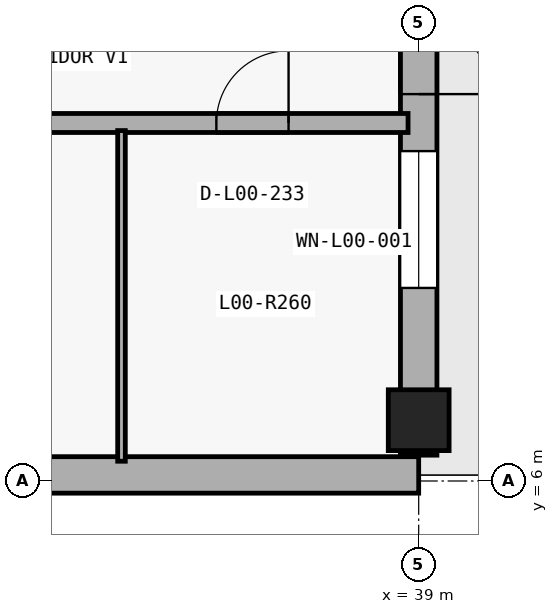
"""IFC4 building model, lengths in metres.
Left out: names, types, materials, properties, quantities, classifications, styles, units other than length and angle.
Written with IfcOpenShell. Run it as: python <this file> out.ifc"""

import sys

from ifc_helpers import new_model, si_unit, direction, frame, frame_2d, origin_with_axes, origin_2d_with_axis, place, context, subcontext, project, spatial, rectangle, circle, extrude, element, fill, save


model = new_model("IFC4")
c1 = context("Model", 3, precision=1e-05, world=origin_with_axes(), true_north=direction((0.0, 1.0)))
c2 = subcontext(c1, "Body", "Model", "MODEL_VIEW")
j1 = project(units=[si_unit("LENGTHUNIT", "METRE"), si_unit("PLANEANGLEUNIT", "RADIAN")], contexts=[c1])
p1 = place(None, origin_with_axes())
s1 = spatial("IfcSite", under=j1, at=p1, CompositionType="ELEMENT")
p2 = place(p1, origin_with_axes())
s2 = spatial("IfcBuilding", under=s1, at=p2, CompositionType="ELEMENT")
p3 = place(p2, origin_with_axes())
s3 = spatial("IfcBuildingStorey", under=s2, at=p3, CompositionType="ELEMENT", Elevation=0.0)
p4 = place(None, frame((6.08, 6.08, 0.0), z_axis=(0.0, 0.0, 1.0), x_axis=(1.0, 0.0, 0.0)))
e1 = element("IfcWall", 1, at=p4, inside=s3, PredefinedType="SOLIDWALL", context=c2, shape_type="SweptSolid", body=[
    extrude(rectangle(XDim=32.92, YDim=0.48, at=frame_2d((16.46, 0.0), x_axis=(1.0, 0.0))), origin_with_axes(), (0.0, 0.0, 1.0), 5.1),
])
p5 = place(None, frame((11.78, 6.08, 0.0), z_axis=(0.0, 0.0, 1.0), x_axis=(1.0, 0.0, 0.0)))
e2 = element("IfcOpeningElement", 2, at=p5, cuts=e1, PredefinedType="OPENING", context=c2, shape_type="SweptSolid", body=[
    extrude(rectangle(XDim=2.4, YDim=2.7, at=frame_2d((0.0, 1.35), x_axis=(1.0, 0.0))), frame((0.0, 0.25, 0.0), z_axis=(0.0, -1.0, 0.0), x_axis=(1.0, 0.0, 0.0)), (0.0, 0.0, 1.0), 0.5),
])
p6 = place(None, frame((32.58, 6.08, 0.0), z_axis=(0.0, 0.0, 1.0), x_axis=(1.0, 0.0, 0.0)))
e3 = element("IfcOpeningElement", 3, at=p6, cuts=e1, PredefinedType="OPENING", context=c2, shape_type="SweptSolid", body=[
    extrude(rectangle(XDim=2.2, YDim=2.6, at=frame_2d((0.0, 1.3), x_axis=(1.0, 0.0))), frame((0.0, 0.25, 0.0), z_axis=(0.0, -1.0, 0.0), x_axis=(1.0, 0.0, 0.0)), (0.0, 0.0, 1.0), 0.5),
])
p7 = place(None, frame((9.18, 6.08, 0.9), z_axis=(0.0, 0.0, 1.0), x_axis=(1.0, 0.0, 0.0)))
e4 = element("IfcOpeningElement", 4, at=p7, cuts=e1, PredefinedType="OPENING", context=c2, shape_type="SweptSolid", body=[
    extrude(rectangle(XDim=1.8, YDim=3.0, at=frame_2d((0.0, 1.5), x_axis=(1.0, 0.0))), frame((0.0, 0.25, 0.0), z_axis=(0.0, -1.0, 0.0), x_axis=(1.0, 0.0, 0.0)), (0.0, 0.0, 1.0), 0.5),
])
p8 = place(None, frame((14.88, 6.08, 0.9), z_axis=(0.0, 0.0, 1.0), x_axis=(1.0, 0.0, 0.0)))
e5 = element("IfcOpeningElement", 5, at=p8, cuts=e1, PredefinedType="OPENING", context=c2, shape_type="SweptSolid", body=[
    extrude(rectangle(XDim=1.5, YDim=2.7, at=frame_2d((0.0, 1.35), x_axis=(1.0, 0.0))), frame((0.0, 0.25, 0.0), z_axis=(0.0, -1.0, 0.0), x_axis=(1.0, 0.0, 0.0)), (0.0, 0.0, 1.0), 0.5),
])
p9 = place(None, frame((17.755, 6.08, 0.95), z_axis=(0.0, 0.0, 1.0), x_axis=(1.0, 0.0, 0.0)))
e6 = element("IfcOpeningElement", 6, at=p9, cuts=e1, PredefinedType="OPENING", context=c2, shape_type="SweptSolid", body=[
    extrude(rectangle(XDim=1.35, YDim=2.5, at=frame_2d((0.0, 1.25), x_axis=(1.0, 0.0))), frame((0.0, 0.25, 0.0), z_axis=(0.0, -1.0, 0.0), x_axis=(1.0, 0.0, 0.0)), (0.0, 0.0, 1.0), 0.5),
])
p10 = place(None, frame((24.13, 6.08, 2.7), z_axis=(0.0, 0.0, 1.0), x_axis=(1.0, 0.0, 0.0)))
e7 = element("IfcOpeningElement", 7, at=p10, cuts=e1, PredefinedType="OPENING", context=c2, shape_type="SweptSolid", body=[
    extrude(rectangle(XDim=2.4, YDim=1.4, at=frame_2d((0.0, 0.7), x_axis=(1.0, 0.0))), frame((0.0, 0.25, 0.0), z_axis=(0.0, -1.0, 0.0), x_axis=(1.0, 0.0, 0.0)), (0.0, 0.0, 1.0), 0.5),
])
p11 = place(None, frame((26.93, 6.08, 2.7), z_axis=(0.0, 0.0, 1.0), x_axis=(1.0, 0.0, 0.0)))
e8 = element("IfcOpeningElement", 8, at=p11, cuts=e1, PredefinedType="OPENING", context=c2, shape_type="SweptSolid", body=[
    extrude(rectangle(XDim=2.1, YDim=1.3, at=frame_2d((0.0, 0.65), x_axis=(1.0, 0.0))), frame((0.0, 0.25, 0.0), z_axis=(0.0, -1.0, 0.0), x_axis=(1.0, 0.0, 0.0)), (0.0, 0.0, 1.0), 0.5),
])
p12 = place(None, frame((39.0, 6.34, 0.0), z_axis=(0.0, 0.0, 1.0), x_axis=(0.0, 1.0, 0.0)))
e9 = element("IfcWall", 9, at=p12, inside=s3, PredefinedType="SOLIDWALL", context=c2, shape_type="SweptSolid", body=[
    extrude(rectangle(XDim=23.95, YDim=0.48, at=frame_2d((11.975, 0.0), x_axis=(1.0, 0.0))), origin_with_axes(), (0.0, 0.0, 1.0), 4.664),
])
p13 = place(None, frame((39.0, 12.04, 0.0), z_axis=(0.0, 0.0, 1.0), x_axis=(0.0, 1.0, 0.0)))
e10 = element("IfcOpeningElement", 10, at=p13, cuts=e9, PredefinedType="OPENING", context=c2, shape_type="SweptSolid", body=[
    extrude(rectangle(XDim=1.9, YDim=2.4, at=frame_2d((0.0, 1.2), x_axis=(1.0, 0.0))), frame((0.0, 0.25, 0.0), z_axis=(0.0, -1.0, 0.0), x_axis=(1.0, 0.0, 0.0)), (0.0, 0.0, 1.0), 0.5),
])
p14 = place(None, frame((39.0, 9.44, 0.364), z_axis=(0.0, 0.0, 1.0), x_axis=(0.0, 1.0, 0.0)))
e11 = element("IfcOpeningElement", 11, at=p14, cuts=e9, PredefinedType="OPENING", context=c2, shape_type="SweptSolid", body=[
    extrude(rectangle(XDim=1.8, YDim=4.2, at=frame_2d((0.0, 2.1), x_axis=(1.0, 0.0))), frame((0.0, 0.25, 0.0), z_axis=(0.0, -1.0, 0.0), x_axis=(1.0, 0.0, 0.0)), (0.0, 0.0, 1.0), 0.5),
])
p15 = place(None, frame((39.0, 15.14, 0.764), z_axis=(0.0, 0.0, 1.0), x_axis=(0.0, 1.0, 0.0)))
e12 = element("IfcOpeningElement", 12, at=p15, cuts=e9, PredefinedType="OPENING", context=c2, shape_type="SweptSolid", body=[
    extrude(rectangle(XDim=1.5, YDim=3.8, at=frame_2d((0.0, 1.9), x_axis=(1.0, 0.0))), frame((0.0, 0.25, 0.0), z_axis=(0.0, -1.0, 0.0), x_axis=(1.0, 0.0, 0.0)), (0.0, 0.0, 1.0), 0.5),
])
p16 = place(None, frame((39.0, 17.94, 1.1), z_axis=(0.0, 0.0, 1.0), x_axis=(0.0, 1.0, 0.0)))
e13 = element("IfcOpeningElement", 13, at=p16, cuts=e9, PredefinedType="OPENING", context=c2, shape_type="SweptSolid", body=[
    extrude(rectangle(XDim=1.2, YDim=3.4, at=frame_2d((0.0, 1.7), x_axis=(1.0, 0.0))), frame((0.0, 0.25, 0.0), z_axis=(0.0, -1.0, 0.0), x_axis=(1.0, 0.0, 0.0)), (0.0, 0.0, 1.0), 0.5),
])
p17 = place(None, frame((39.0, 24.24, 0.85), z_axis=(0.0, 0.0, 1.0), x_axis=(0.0, 1.0, 0.0)))
e14 = element("IfcOpeningElement", 14, at=p17, cuts=e9, PredefinedType="OPENING", context=c2, shape_type="SweptSolid", body=[
    extrude(rectangle(XDim=2.1, YDim=3.3, at=frame_2d((0.0, 1.65), x_axis=(1.0, 0.0))), frame((0.0, 0.25, 0.0), z_axis=(0.0, -1.0, 0.0), x_axis=(1.0, 0.0, 0.0)), (0.0, 0.0, 1.0), 0.5),
])
p18 = place(None, frame((33.95, 10.71, 0.0), z_axis=(0.0, 0.0, 1.0), x_axis=(1.0, 0.0, 0.0)))
e15 = element("IfcWall", 15, at=p18, inside=s3, PredefinedType="PARTITIONING", context=c2, shape_type="SweptSolid", body=[
    extrude(rectangle(XDim=4.91, YDim=0.25, at=frame_2d((2.455, 0.0), x_axis=(1.0, 0.0))), origin_with_axes(), (0.0, 0.0, 1.0), 5.08),
])
p19 = place(None, frame((36.813, 10.71, 0.0), z_axis=(0.0, 0.0, 1.0), x_axis=(1.0, 0.0, 0.0)))
e16 = element("IfcOpeningElement", 16, at=p19, cuts=e15, PredefinedType="OPENING", context=c2, shape_type="SweptSolid", body=[
    extrude(rectangle(XDim=0.95, YDim=2.1, at=frame_2d((0.0, 1.05), x_axis=(1.0, 0.0))), frame((0.0, 0.135, 0.0), z_axis=(0.0, -1.0, 0.0), x_axis=(1.0, 0.0, 0.0)), (0.0, 0.0, 1.0), 0.27),
])
p20 = place(None, frame((35.09, 6.26, 0.0), z_axis=(0.0, 0.0, 1.0), x_axis=(0.0, 1.0, 0.0)))
e17 = element("IfcWall", 17, at=p20, inside=s3, PredefinedType="PARTITIONING", context=c2, shape_type="SweptSolid", body=[
    extrude(rectangle(XDim=4.35, YDim=0.1, at=frame_2d((2.175, 0.0), x_axis=(1.0, 0.0))), origin_with_axes(), (0.0, 0.0, 1.0), 5.08),
])
p21 = place(None, frame((39.0, 6.8, 0.0), z_axis=(0.0, 0.0, 1.0), x_axis=(1.0, 0.0, 0.0)))
e18 = element("IfcColumn", 18, at=p21, inside=s3, PredefinedType="COLUMN", context=c2, shape_type="SweptSolid", body=[
    extrude(circle(Radius=0.4, at=origin_2d_with_axis()), origin_with_axes(), (0.0, 0.0, 1.0), 5.4),
])
p22 = place(None, frame((39.0, 12.04, 0.0), z_axis=(0.0, 0.0, 1.0), x_axis=(0.0, -1.0, 0.0)))
e19 = element("IfcDoor", 19, at=p22, inside=s3, OperationType="DOUBLE_DOOR_SINGLE_SWING", PredefinedType="DOOR", context=c2, shape_type="SweptSolid", body=[
    extrude(rectangle(XDim=1.9, YDim=2.4, at=frame_2d((0.0, 1.2), x_axis=(1.0, 0.0))), frame((0.0, 0.04, 0.0), z_axis=(0.0, -1.0, 0.0), x_axis=(1.0, 0.0, 0.0)), (0.0, 0.0, 1.0), 0.08),
])
fill(e10, e19)
p23 = place(None, frame((36.813, 10.71, 0.0), z_axis=(0.0, 0.0, 1.0), x_axis=(1.0, 0.0, 0.0)))
e20 = element("IfcDoor", 20, at=p23, inside=s3, OperationType="SINGLE_SWING_RIGHT", PredefinedType="DOOR", context=c2, shape_type="SweptSolid", body=[
    extrude(rectangle(XDim=0.95, YDim=2.1, at=frame_2d((0.0, 1.05), x_axis=(1.0, 0.0))), frame((0.0, 0.04, 0.0), z_axis=(0.0, -1.0, 0.0), x_axis=(1.0, 0.0, 0.0)), (0.0, 0.0, 1.0), 0.08),
])
fill(e16, e20)
p24 = place(None, frame((39.0, 9.44, 0.364), z_axis=(0.0, 0.0, 1.0), x_axis=(0.0, 1.0, 0.0)))
e21 = element("IfcWindow", 21, at=p24, inside=s3, PartitioningType="SINGLE_PANEL", PredefinedType="WINDOW", context=c2, shape_type="SweptSolid", body=[
    extrude(rectangle(XDim=1.8, YDim=4.2, at=frame_2d((0.0, 2.1), x_axis=(1.0, 0.0))), frame((0.0, 0.03, 0.0), z_axis=(0.0, -1.0, 0.0), x_axis=(1.0, 0.0, 0.0)), (0.0, 0.0, 1.0), 0.06),
])
fill(e11, e21)
save(model, sys.argv[1])
